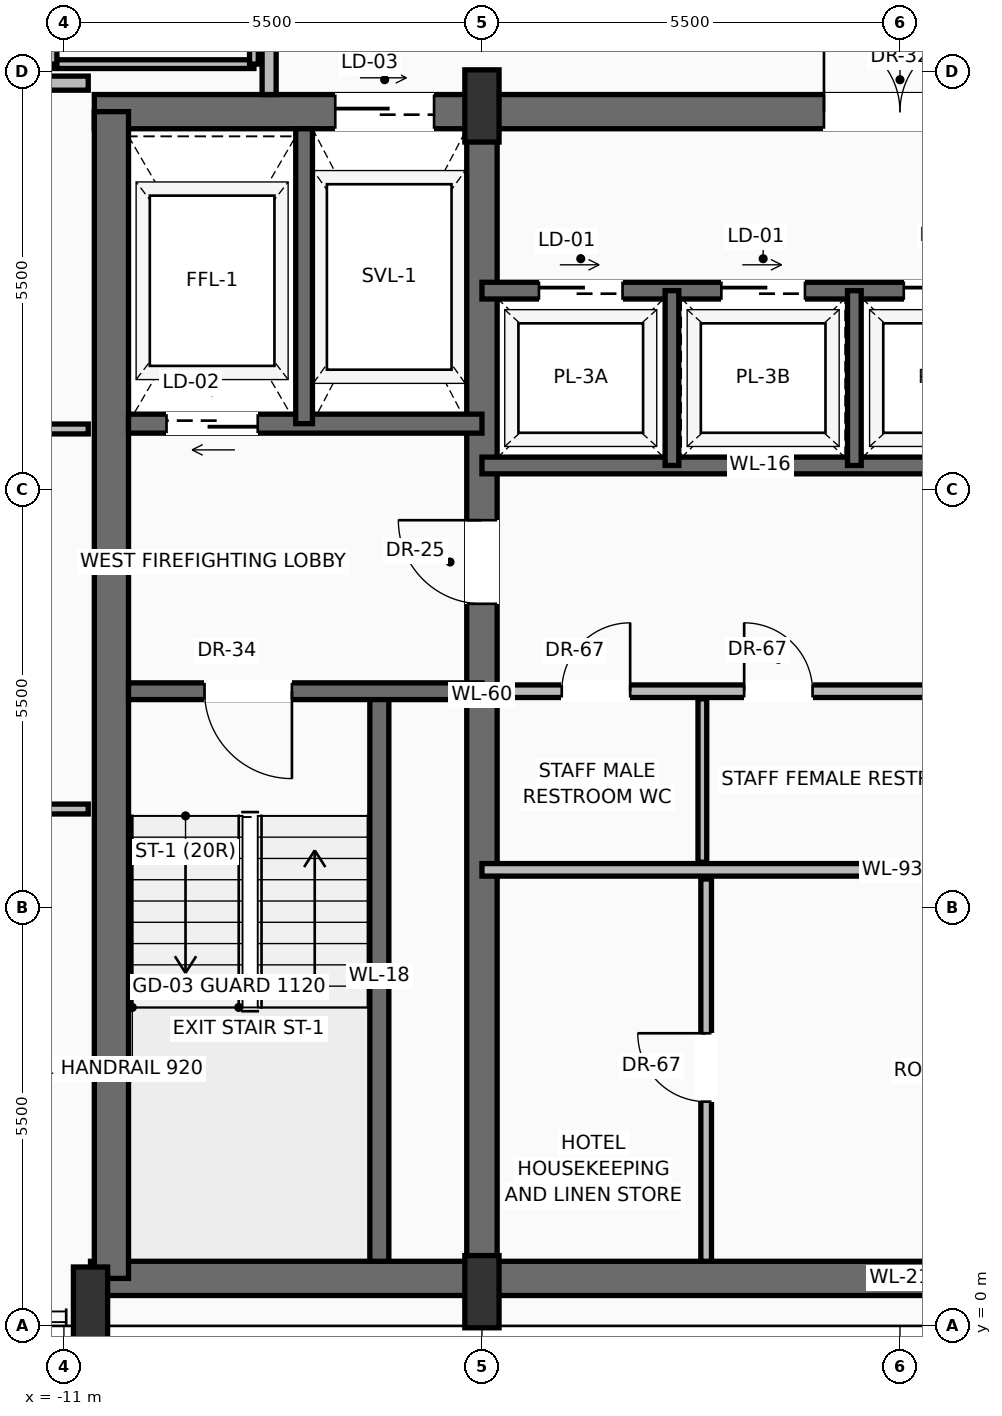
"""IFC4 building model, lengths in metres.
Left out: names, types, materials, properties, quantities, classifications, styles, units other than length and angle.
Written with IfcOpenShell. Run it as: python <this file> out.ifc"""

import sys

from ifc_helpers import new_model, si_unit, direction, frame, frame_2d, origin, origin_2d, place, context, subcontext, project, spatial, rectangle, extrude, source, transform, mapped, element, fill, save


model = new_model("IFC4")
c1 = context("Model", 3, precision=1e-05, world=origin(), true_north=direction((0.0, 1.0)))
c2 = subcontext(c1, "Body", "Model", "MODEL_VIEW")
j1 = project(units=[si_unit("LENGTHUNIT", "METRE"), si_unit("PLANEANGLEUNIT", "RADIAN")], contexts=[c1])
p1 = place(None, origin())
s1 = spatial("IfcSite", under=j1, at=p1, CompositionType="ELEMENT")
p2 = place(p1, origin())
s2 = spatial("IfcBuilding", under=s1, at=p2, CompositionType="ELEMENT")
p3 = place(p2, frame((0.0, 0.0, 262.65)))
s3 = spatial("IfcBuildingStorey", under=s2, at=p3, CompositionType="ELEMENT", Elevation=262.65)
p4 = place(p3, frame((-10.65, 0.625, 0.0), z_axis=(0.0, 0.0, 1.0), x_axis=(1.0, 0.0, 0.0)))
e1 = element("IfcWall", 1, at=p4, inside=s3, PredefinedType="SHEAR", context=c2, shape_type="SweptSolid", body=[
    extrude(rectangle(XDim=21.3, YDim=0.45, at=frame_2d((10.65, 0.0))), origin(), (0.0, 0.0, 1.0), 3.24),
])
p5 = place(p3, frame((-10.6, 15.975, 0.0), z_axis=(0.0, 0.0, 1.0), x_axis=(1.0, 0.0, 0.0)))
e2 = element("IfcWall", 2, at=p5, inside=s3, PredefinedType="SHEAR", context=c2, shape_type="SweptSolid", body=[
    extrude(rectangle(XDim=21.2, YDim=0.45, at=frame_2d((10.6, 0.0))), origin(), (0.0, 0.0, 1.0), 3.24),
])
p6 = place(p5, frame((3.17, 0.0, 0.0)))
e3 = element("IfcOpeningElement", 3, at=p6, cuts=e2, PredefinedType="OPENING", context=c2, shape_type="SweptSolid", body=[
    extrude(rectangle(XDim=1.3, YDim=2.3, at=frame_2d((0.65, 1.15))), frame((0.0, 0.235, 0.0), z_axis=(0.0, -1.0, 0.0), x_axis=(1.0, 0.0, 0.0)), (0.0, 0.0, 1.0), 0.47),
])
p7 = place(p5, frame((9.6, 0.0, 0.0)))
e4 = element("IfcOpeningElement", 4, at=p7, cuts=e2, PredefinedType="OPENING", context=c2, shape_type="SweptSolid", body=[
    extrude(rectangle(XDim=2.0, YDim=2.4, at=frame_2d((1.0, 1.2))), frame((0.0, 0.235, 0.0), z_axis=(0.0, -1.0, 0.0), x_axis=(1.0, 0.0, 0.0)), (0.0, 0.0, 1.0), 0.47),
])
p8 = place(p3, frame((-10.375, 0.625, 0.0), z_axis=(0.0, 0.0, 1.0), x_axis=(0.0, 1.0, 0.0)))
e5 = element("IfcWall", 5, at=p8, inside=s3, PredefinedType="SHEAR", context=c2, shape_type="SweptSolid", body=[
    extrude(rectangle(XDim=15.35, YDim=0.45, at=frame_2d((7.675, 0.0))), origin(), (0.0, 0.0, 1.0), 3.24),
])
p9 = place(p3, frame((-5.5, 0.625, 0.0), z_axis=(0.0, 0.0, 1.0), x_axis=(0.0, 1.0, 0.0)))
e6 = element("IfcWall", 6, at=p9, inside=s3, PredefinedType="SHEAR", context=c2, shape_type="SweptSolid", body=[
    extrude(rectangle(XDim=15.35, YDim=0.4, at=frame_2d((7.675, 0.0))), origin(), (0.0, 0.0, 1.0), 3.24),
])
p10 = place(p9, frame((8.875, 0.0, 0.0)))
e7 = element("IfcOpeningElement", 7, at=p10, cuts=e6, PredefinedType="OPENING", context=c2, shape_type="SweptSolid", body=[
    extrude(rectangle(XDim=1.1, YDim=2.2, at=frame_2d((0.55, 1.1))), frame((0.0, 0.21, 0.0), z_axis=(0.0, -1.0, 0.0), x_axis=(1.0, 0.0, 0.0)), (0.0, 0.0, 1.0), 0.42),
])
m1 = source(origin(), c2, "Body", "SweptSolid", [
    extrude(rectangle(XDim=0.45, YDim=0.95, at=origin_2d()), origin(), (0.0, 0.0, 1.0), 3.45),
])
for number, where, z_axis, x_axis in (
    (8, (-10.65, 0.3, 0.0), (0.0, 0.0, 1.0), (1.0, 0.0, 0.0)),
    (9, (-5.5, 0.45, 0.0), (0.0, 0.0, 1.0), (1.0, 0.0, 0.0)),
    (10, (-5.5, 16.05, 0.0), (0.0, 0.0, 1.0), (1.0, 0.0, 0.0)),
):
    element("IfcColumn", number, at=place(p3, frame(where, z_axis=z_axis, x_axis=x_axis)), inside=s3, PredefinedType="PILASTER", context=c2, shape_type="MappedRepresentation", body=[
        mapped(m1, transform((0.0, 0.0, 0.0), scale=1.0)),
    ])
p11 = place(p3, frame((-18.804, 14.545, 0.0), z_axis=(0.0, 0.0, 1.0), x_axis=(0.502487235879, 0.864584627309, 0.0)))
e11 = element("IfcWall", 11, at=p11, inside=s3, PredefinedType="SOLIDWALL", context=c2, shape_type="SweptSolid", body=[
    extrude(rectangle(XDim=19.908, YDim=0.28, at=frame_2d((9.954, 0.0))), origin(), (0.0, 0.0, 1.0), 2.82),
])
p12 = place(p11, frame((4.778, 0.0, 0.0)))
e12 = element("IfcOpeningElement", 12, at=p12, cuts=e11, PredefinedType="OPENING", context=c2, shape_type="SweptSolid", body=[
    extrude(rectangle(XDim=1.6, YDim=2.35, at=frame_2d((0.8, 1.175))), frame((0.0, 0.15, 0.0), z_axis=(0.0, -1.0, 0.0), x_axis=(1.0, 0.0, 0.0)), (0.0, 0.0, 1.0), 0.3),
])
p13 = place(p11, frame((13.538, 0.0, 0.9)))
e13 = element("IfcOpeningElement", 13, at=p13, cuts=e11, PredefinedType="OPENING", context=c2, shape_type="SweptSolid", body=[
    extrude(rectangle(XDim=2.0, YDim=1.75, at=frame_2d((1.0, 0.875))), frame((0.0, 0.15, 0.0), z_axis=(0.0, -1.0, 0.0), x_axis=(1.0, 0.0, 0.0)), (0.0, 0.0, 1.0), 0.3),
])
p14 = place(p3, frame((-6.85, 0.85, 0.0), z_axis=(0.0, 0.0, 1.0), x_axis=(0.0, 1.0, 0.0)))
e14 = element("IfcWall", 14, at=p14, inside=s3, PredefinedType="SOLIDWALL", context=c2, shape_type="SweptSolid", body=[
    extrude(rectangle(XDim=7.5, YDim=0.25, at=frame_2d((3.75, 0.0))), origin(), (0.0, 0.0, 1.0), 3.24),
])
p15 = place(p3, frame((-5.5, 8.35, 0.0), z_axis=(0.0, 0.0, 1.0), x_axis=(-1.0, 0.0, 0.0)))
e15 = element("IfcWall", 15, at=p15, inside=s3, PredefinedType="SOLIDWALL", context=c2, shape_type="SweptSolid", body=[
    extrude(rectangle(XDim=4.65, YDim=0.22, at=frame_2d((2.325, 0.0))), origin(), (0.0, 0.0, 1.0), 3.24),
])
p16 = place(p15, frame((2.5, 0.0, 0.0)))
e16 = element("IfcOpeningElement", 16, at=p16, cuts=e15, PredefinedType="OPENING", context=c2, shape_type="SweptSolid", body=[
    extrude(rectangle(XDim=1.15, YDim=2.2, at=frame_2d((0.575, 1.1))), frame((0.0, 0.12, 0.0), z_axis=(0.0, -1.0, 0.0), x_axis=(1.0, 0.0, 0.0)), (0.0, 0.0, 1.0), 0.24),
])
p17 = place(p3, frame((-5.5, 11.87, 0.0), z_axis=(0.0, 0.0, 1.0), x_axis=(-1.0, 0.0, 0.0)))
e17 = element("IfcWall", 17, at=p17, inside=s3, PredefinedType="SOLIDWALL", context=c2, shape_type="SweptSolid", body=[
    extrude(rectangle(XDim=4.65, YDim=0.25, at=frame_2d((2.325, 0.0))), origin(), (0.0, 0.0, 1.0), 3.24),
])
p18 = place(p17, frame((2.95, 0.0, 0.0)))
e18 = element("IfcOpeningElement", 18, at=p18, cuts=e17, PredefinedType="OPENING", context=c2, shape_type="SweptSolid", body=[
    extrude(rectangle(XDim=1.2, YDim=2.25, at=frame_2d((0.6, 1.125))), frame((0.0, 0.135, 0.0), z_axis=(0.0, -1.0, 0.0), x_axis=(1.0, 0.0, 0.0)), (0.0, 0.0, 1.0), 0.27),
])
p19 = place(p3, frame((-7.84, 11.87, 0.0), z_axis=(0.0, 0.0, 1.0), x_axis=(0.0, 1.0, 0.0)))
e19 = element("IfcWall", 19, at=p19, inside=s3, PredefinedType="SOLIDWALL", context=c2, shape_type="SweptSolid", body=[
    extrude(rectangle(XDim=3.88, YDim=0.22, at=frame_2d((1.94, 0.0))), origin(), (0.0, 0.0, 1.0), 3.24),
])
p20 = place(p3, frame((-5.5, 6.0, 0.0), z_axis=(0.0, 0.0, 1.0), x_axis=(1.0, 0.0, 0.0)))
e20 = element("IfcWall", 20, at=p20, inside=s3, PredefinedType="PARTITIONING", context=c2, shape_type="SweptSolid", body=[
    extrude(rectangle(XDim=10.8, YDim=0.165, at=frame_2d((5.4, 0.0))), origin(), (0.0, 0.0, 1.0), 3.232),
])
p21 = place(p20, frame((7.7, 0.0, 0.0)))
e21 = element("IfcOpeningElement", 21, at=p21, cuts=e20, PredefinedType="OPENING", context=c2, shape_type="SweptSolid", body=[
    extrude(rectangle(XDim=0.9, YDim=2.1, at=frame_2d((0.45, 1.05))), frame((0.0, 0.093, 0.0), z_axis=(0.0, -1.0, 0.0), x_axis=(1.0, 0.0, 0.0)), (0.0, 0.0, 1.0), 0.185),
])
p22 = place(p3, frame((-2.55, 0.85, 0.0), z_axis=(0.0, 0.0, 1.0), x_axis=(0.0, 1.0, 0.0)))
e22 = element("IfcWall", 22, at=p22, inside=s3, PredefinedType="PARTITIONING", context=c2, shape_type="SweptSolid", body=[
    extrude(rectangle(XDim=5.03, YDim=0.14, at=frame_2d((2.515, 0.0))), origin(), (0.0, 0.0, 1.0), 3.232),
])
p23 = place(p22, frame((2.1, 0.0, 0.0)))
e23 = element("IfcOpeningElement", 23, at=p23, cuts=e22, PredefinedType="OPENING", context=c2, shape_type="SweptSolid", body=[
    extrude(rectangle(XDim=0.9, YDim=2.1, at=frame_2d((0.45, 1.05))), frame((0.0, 0.08, 0.0), z_axis=(0.0, -1.0, 0.0), x_axis=(1.0, 0.0, 0.0)), (0.0, 0.0, 1.0), 0.16),
])
p24 = place(p3, frame((-5.3, 8.35, 0.0), z_axis=(0.0, 0.0, 1.0), x_axis=(1.0, 0.0, 0.0)))
e24 = element("IfcWall", 24, at=p24, inside=s3, PredefinedType="PARTITIONING", context=c2, shape_type="SweptSolid", body=[
    extrude(rectangle(XDim=7.12, YDim=0.165, at=frame_2d((3.56, 0.0))), origin(), (0.0, 0.0, 1.0), 3.232),
])
p25 = place(p24, frame((0.85, 0.0, 0.0)))
e25 = element("IfcOpeningElement", 25, at=p25, cuts=e24, PredefinedType="OPENING", context=c2, shape_type="SweptSolid", body=[
    extrude(rectangle(XDim=0.9, YDim=2.1, at=frame_2d((0.45, 1.05))), frame((0.0, 0.093, 0.0), z_axis=(0.0, -1.0, 0.0), x_axis=(1.0, 0.0, 0.0)), (0.0, 0.0, 1.0), 0.185),
])
p26 = place(p24, frame((3.25, 0.0, 0.0)))
e26 = element("IfcOpeningElement", 26, at=p26, cuts=e24, PredefinedType="OPENING", context=c2, shape_type="SweptSolid", body=[
    extrude(rectangle(XDim=0.9, YDim=2.1, at=frame_2d((0.45, 1.05))), frame((0.0, 0.093, 0.0), z_axis=(0.0, -1.0, 0.0), x_axis=(1.0, 0.0, 0.0)), (0.0, 0.0, 1.0), 0.185),
])
p27 = place(p3, frame((-2.6, 6.1, 0.0), z_axis=(0.0, 0.0, 1.0), x_axis=(0.0, 1.0, 0.0)))
e27 = element("IfcWall", 27, at=p27, inside=s3, PredefinedType="PARTITIONING", context=c2, shape_type="SweptSolid", body=[
    extrude(rectangle(XDim=2.15, YDim=0.115, at=frame_2d((1.075, 0.0))), origin(), (0.0, 0.0, 1.0), 3.232),
])
p28 = place(p3, frame((-5.5, 11.32, 0.0), z_axis=(0.0, 0.0, 1.0), x_axis=(1.0, 0.0, 0.0)))
e28 = element("IfcWall", 28, at=p28, inside=s3, PredefinedType="SOLIDWALL", context=c2, shape_type="SweptSolid", body=[
    extrude(rectangle(XDim=7.32, YDim=0.22, at=frame_2d((3.66, 0.0))), origin(), (0.0, 0.0, 1.0), 3.24),
])
p29 = place(p3, frame((-5.5, 13.62, 0.0), z_axis=(0.0, 0.0, 1.0), x_axis=(1.0, 0.0, 0.0)))
e29 = element("IfcWall", 29, at=p29, inside=s3, PredefinedType="SOLIDWALL", context=c2, shape_type="SweptSolid", body=[
    extrude(rectangle(XDim=7.32, YDim=0.22, at=frame_2d((3.66, 0.0))), origin(), (0.0, 0.0, 1.0), 3.24),
])
p30 = place(p29, frame((0.75, 0.0, 0.0)))
e30 = element("IfcOpeningElement", 30, at=p30, cuts=e29, PredefinedType="OPENING", context=c2, shape_type="SweptSolid", body=[
    extrude(rectangle(XDim=1.1, YDim=2.2, at=frame_2d((0.55, 1.1))), frame((0.0, 0.12, 0.0), z_axis=(0.0, -1.0, 0.0), x_axis=(1.0, 0.0, 0.0)), (0.0, 0.0, 1.0), 0.24),
])
p31 = place(p29, frame((3.15, 0.0, 0.0)))
e31 = element("IfcOpeningElement", 31, at=p31, cuts=e29, PredefinedType="OPENING", context=c2, shape_type="SweptSolid", body=[
    extrude(rectangle(XDim=1.1, YDim=2.2, at=frame_2d((0.55, 1.1))), frame((0.0, 0.12, 0.0), z_axis=(0.0, -1.0, 0.0), x_axis=(1.0, 0.0, 0.0)), (0.0, 0.0, 1.0), 0.24),
])
p32 = place(p29, frame((5.55, 0.0, 0.0)))
e32 = element("IfcOpeningElement", 32, at=p32, cuts=e29, PredefinedType="OPENING", context=c2, shape_type="SweptSolid", body=[
    extrude(rectangle(XDim=1.1, YDim=2.2, at=frame_2d((0.55, 1.1))), frame((0.0, 0.12, 0.0), z_axis=(0.0, -1.0, 0.0), x_axis=(1.0, 0.0, 0.0)), (0.0, 0.0, 1.0), 0.24),
])
for number, where, z_axis, x_axis in (
    (33, (-3.0, 11.32, 0.0), (0.0, 0.0, 1.0), (0.0, 1.0, 0.0)),
    (34, (-0.6, 11.32, 0.0), (0.0, 0.0, 1.0), (0.0, 1.0, 0.0)),
):
    element("IfcWall", number, at=place(p3, frame(where, z_axis=z_axis, x_axis=x_axis)), inside=s3, PredefinedType="SOLIDWALL", context=c2, shape_type="SweptSolid", body=[
        extrude(rectangle(XDim=2.3, YDim=0.18, at=frame_2d((1.15, 0.0))), origin(), (0.0, 0.0, 1.0), 3.24),
    ])
p33 = place(p3, frame((-8.3, 16.2, 0.0), z_axis=(0.0, 0.0, 1.0), x_axis=(0.0, 1.0, 0.0)))
e35 = element("IfcWall", 35, at=p33, inside=s3, PredefinedType="PARTITIONING", context=c2, shape_type="SweptSolid", body=[
    extrude(rectangle(XDim=12.2, YDim=0.185, at=frame_2d((6.1, 0.0))), origin(), (0.0, 0.0, 1.0), 3.232),
])
p34 = place(p33, frame((3.214, 0.0, 0.0)))
e36 = element("IfcOpeningElement", 36, at=p34, cuts=e35, PredefinedType="OPENING", context=c2, shape_type="SweptSolid", body=[
    extrude(rectangle(XDim=1.05, YDim=2.25, at=frame_2d((0.525, 1.125))), frame((0.0, 0.103, 0.0), z_axis=(0.0, -1.0, 0.0), x_axis=(1.0, 0.0, 0.0)), (0.0, 0.0, 1.0), 0.205),
])
p35 = place(p33, frame((7.794, 0.0, 0.0)))
e37 = element("IfcOpeningElement", 37, at=p35, cuts=e35, PredefinedType="OPENING", context=c2, shape_type="SweptSolid", body=[
    extrude(rectangle(XDim=1.05, YDim=2.25, at=frame_2d((0.525, 1.125))), frame((0.0, 0.103, 0.0), z_axis=(0.0, -1.0, 0.0), x_axis=(1.0, 0.0, 0.0)), (0.0, 0.0, 1.0), 0.205),
])
p36 = place(p3, frame((-17.905, 16.35, 0.0), z_axis=(0.0, 0.0, 1.0), x_axis=(1.0, 0.0, 0.0)))
e38 = element("IfcWall", 38, at=p36, inside=s3, PredefinedType="PARTITIONING", context=c2, shape_type="SweptSolid", body=[
    extrude(rectangle(XDim=7.225, YDim=0.185, at=frame_2d((3.613, 0.0))), origin(), (0.0, 0.0, 1.0), 3.232),
])
p37 = place(p36, frame((4.069, 0.0, 0.0)))
e39 = element("IfcOpeningElement", 39, at=p37, cuts=e38, PredefinedType="OPENING", context=c2, shape_type="SweptSolid", body=[
    extrude(rectangle(XDim=1.05, YDim=2.25, at=frame_2d((0.525, 1.125))), frame((0.0, 0.103, 0.0), z_axis=(0.0, -1.0, 0.0), x_axis=(1.0, 0.0, 0.0)), (0.0, 0.0, 1.0), 0.205),
])
p38 = place(p3, frame((-23.456, 6.8, 0.0), z_axis=(0.0, 0.0, 1.0), x_axis=(1.0, 0.0, 0.0)))
e40 = element("IfcWall", 40, at=p38, inside=s3, PredefinedType="PARTITIONING", context=c2, shape_type="SweptSolid", body=[
    extrude(rectangle(XDim=12.776, YDim=0.13, at=frame_2d((6.388, 0.0))), origin(), (0.0, 0.0, 1.0), 3.232),
])
p39 = place(p38, frame((5.308, 0.0, 0.0)))
e41 = element("IfcOpeningElement", 41, at=p39, cuts=e40, PredefinedType="OPENING", context=c2, shape_type="SweptSolid", body=[
    extrude(rectangle(XDim=0.95, YDim=2.2, at=frame_2d((0.475, 1.1))), frame((0.0, 0.075, 0.0), z_axis=(0.0, -1.0, 0.0), x_axis=(1.0, 0.0, 0.0)), (0.0, 0.0, 1.0), 0.15),
])
p40 = place(p3, frame((-20.55, 11.8, 0.0), z_axis=(0.0, 0.0, 1.0), x_axis=(1.0, 0.0, 0.0)))
e42 = element("IfcWall", 42, at=p40, inside=s3, PredefinedType="PARTITIONING", context=c2, shape_type="SweptSolid", body=[
    extrude(rectangle(XDim=9.87, YDim=0.13, at=frame_2d((4.935, 0.0))), origin(), (0.0, 0.0, 1.0), 3.232),
])
p41 = place(p40, frame((4.0, 0.0, 0.0)))
e43 = element("IfcOpeningElement", 43, at=p41, cuts=e42, PredefinedType="OPENING", context=c2, shape_type="SweptSolid", body=[
    extrude(rectangle(XDim=0.95, YDim=2.2, at=frame_2d((0.475, 1.1))), frame((0.0, 0.075, 0.0), z_axis=(0.0, -1.0, 0.0), x_axis=(1.0, 0.0, 0.0)), (0.0, 0.0, 1.0), 0.15),
])
p42 = place(p3, frame((-11.15, 16.6, 0.0), z_axis=(0.0, 0.0, 1.0), x_axis=(1.0, 0.0, 0.0)))
e44 = element("IfcWall", 44, at=p42, inside=s3, PredefinedType="PARTITIONING", context=c2, shape_type="SweptSolid", body=[
    extrude(rectangle(XDim=2.65, YDim=0.115, at=frame_2d((1.325, 0.0))), origin(), (0.0, 0.0, 1.0), 3.232),
])
p43 = place(p3, frame((-11.15, 16.6, 0.0), z_axis=(0.0, 0.0, 1.0), x_axis=(0.0, 1.0, 0.0)))
e45 = element("IfcWall", 45, at=p43, inside=s3, PredefinedType="PARTITIONING", context=c2, shape_type="SweptSolid", body=[
    extrude(rectangle(XDim=2.4, YDim=0.115, at=frame_2d((1.2, 0.0))), origin(), (0.0, 0.0, 1.0), 3.232),
])
p44 = place(p43, frame((0.75, 0.0, 0.0)))
e46 = element("IfcOpeningElement", 46, at=p44, cuts=e45, PredefinedType="OPENING", context=c2, shape_type="SweptSolid", body=[
    extrude(rectangle(XDim=0.9, YDim=2.15, at=frame_2d((0.45, 1.075))), frame((0.0, 0.067, 0.0), z_axis=(0.0, -1.0, 0.0), x_axis=(1.0, 0.0, 0.0)), (0.0, 0.0, 1.0), 0.135),
])
p45 = place(p3, frame((-8.5, 16.6, 0.0), z_axis=(0.0, 0.0, 1.0), x_axis=(0.0, 1.0, 0.0)))
e47 = element("IfcWall", 47, at=p45, inside=s3, PredefinedType="PARTITIONING", context=c2, shape_type="SweptSolid", body=[
    extrude(rectangle(XDim=2.4, YDim=0.115, at=frame_2d((1.2, 0.0))), origin(), (0.0, 0.0, 1.0), 3.232),
])
m2 = source(origin(), c2, "Body", "SweptSolid", [
    extrude(rectangle(XDim=1.15, YDim=2.2, at=frame_2d((0.575, 1.1))), frame((0.0, 0.025, 0.0), z_axis=(0.0, -1.0, 0.0), x_axis=(1.0, 0.0, 0.0)), (0.0, 0.0, 1.0), 0.05),
])
p46 = place(p16, origin())
e48 = element("IfcDoor", 48, at=p46, inside=s3, OperationType="SINGLE_SWING_LEFT", PredefinedType="DOOR", context=c2, shape_type="MappedRepresentation", body=[
    mapped(m2, transform((0.0, 0.0, 0.0), scale=1.0)),
])
fill(e16, e48)
m3 = source(origin(), c2, "Body", "SweptSolid", [
    extrude(rectangle(XDim=1.1, YDim=2.2, at=frame_2d((0.55, 1.1))), frame((0.0, 0.025, 0.0), z_axis=(0.0, -1.0, 0.0), x_axis=(1.0, 0.0, 0.0)), (0.0, 0.0, 1.0), 0.05),
])
p47 = place(p10, origin())
e49 = element("IfcDoor", 49, at=p47, inside=s3, OperationType="SINGLE_SWING_RIGHT", PredefinedType="DOOR", context=c2, shape_type="MappedRepresentation", body=[
    mapped(m3, transform((0.0, 0.0, 0.0), scale=1.0)),
])
fill(e7, e49)
m4 = source(origin(), c2, "Body", "SweptSolid", [
    extrude(rectangle(XDim=1.2, YDim=2.25, at=frame_2d((0.6, 1.125))), frame((0.0, 0.025, 0.0), z_axis=(0.0, -1.0, 0.0), x_axis=(1.0, 0.0, 0.0)), (0.0, 0.0, 1.0), 0.05),
])
p48 = place(p18, origin())
e50 = element("IfcDoor", 50, at=p48, inside=s3, OperationType="SLIDING_TO_LEFT", PredefinedType="DOOR", context=c2, shape_type="MappedRepresentation", body=[
    mapped(m4, transform((0.0, 0.0, 0.0), scale=1.0)),
])
fill(e18, e50)
m5 = source(origin(), c2, "Body", "SweptSolid", [
    extrude(rectangle(XDim=1.3, YDim=2.3, at=frame_2d((0.65, 1.15))), frame((0.0, 0.025, 0.0), z_axis=(0.0, -1.0, 0.0), x_axis=(1.0, 0.0, 0.0)), (0.0, 0.0, 1.0), 0.05),
])
p49 = place(p6, origin())
e51 = element("IfcDoor", 51, at=p49, inside=s3, OperationType="SLIDING_TO_RIGHT", PredefinedType="DOOR", context=c2, shape_type="MappedRepresentation", body=[
    mapped(m5, transform((0.0, 0.0, 0.0), scale=1.0)),
])
fill(e3, e51)
m6 = source(origin(), c2, "Body", "SweptSolid", [
    extrude(rectangle(XDim=2.0, YDim=2.4, at=frame_2d((1.0, 1.2))), frame((0.0, 0.025, 0.0), z_axis=(0.0, -1.0, 0.0), x_axis=(1.0, 0.0, 0.0)), (0.0, 0.0, 1.0), 0.05),
])
p50 = place(p7, origin())
e52 = element("IfcDoor", 52, at=p50, inside=s3, OperationType="DOUBLE_DOOR_SINGLE_SWING", PredefinedType="DOOR", context=c2, shape_type="MappedRepresentation", body=[
    mapped(m6, transform((0.0, 0.0, 0.0), scale=1.0)),
])
fill(e4, e52)
m7 = source(origin(), c2, "Body", "SweptSolid", [
    extrude(rectangle(XDim=0.9, YDim=2.1, at=frame_2d((0.45, 1.05))), frame((0.0, 0.025, 0.0), z_axis=(0.0, -1.0, 0.0), x_axis=(1.0, 0.0, 0.0)), (0.0, 0.0, 1.0), 0.05),
])
p51 = place(p23, origin())
e53 = element("IfcDoor", 53, at=p51, inside=s3, OperationType="SINGLE_SWING_RIGHT", PredefinedType="DOOR", context=c2, shape_type="MappedRepresentation", body=[
    mapped(m7, transform((0.0, 0.0, 0.0), scale=1.0)),
])
fill(e23, e53)
p52 = place(p25, origin())
e54 = element("IfcDoor", 54, at=p52, inside=s3, OperationType="SINGLE_SWING_RIGHT", PredefinedType="DOOR", context=c2, shape_type="MappedRepresentation", body=[
    mapped(m7, transform((0.0, 0.0, 0.0), scale=1.0)),
])
fill(e25, e54)
p53 = place(p26, origin())
e55 = element("IfcDoor", 55, at=p53, inside=s3, OperationType="SINGLE_SWING_LEFT", PredefinedType="DOOR", context=c2, shape_type="MappedRepresentation", body=[
    mapped(m7, transform((0.0, 0.0, 0.0), scale=1.0)),
])
fill(e26, e55)
m8 = source(origin(), c2, "Body", "SweptSolid", [
    extrude(rectangle(XDim=1.1, YDim=2.2, at=frame_2d((0.55, 1.1))), frame((0.0, 0.025, 0.0), z_axis=(0.0, -1.0, 0.0), x_axis=(1.0, 0.0, 0.0)), (0.0, 0.0, 1.0), 0.05),
])
p54 = place(p30, origin())
e56 = element("IfcDoor", 56, at=p54, inside=s3, OperationType="SLIDING_TO_RIGHT", PredefinedType="DOOR", context=c2, shape_type="MappedRepresentation", body=[
    mapped(m8, transform((0.0, 0.0, 0.0), scale=1.0)),
])
fill(e30, e56)
p55 = place(p31, origin())
e57 = element("IfcDoor", 57, at=p55, inside=s3, OperationType="SLIDING_TO_RIGHT", PredefinedType="DOOR", context=c2, shape_type="MappedRepresentation", body=[
    mapped(m8, transform((0.0, 0.0, 0.0), scale=1.0)),
])
fill(e31, e57)
p56 = place(p32, origin())
e58 = element("IfcDoor", 58, at=p56, inside=s3, OperationType="SLIDING_TO_RIGHT", PredefinedType="DOOR", context=c2, shape_type="MappedRepresentation", body=[
    mapped(m8, transform((0.0, 0.0, 0.0), scale=1.0)),
])
fill(e32, e58)
save(model, sys.argv[1])
